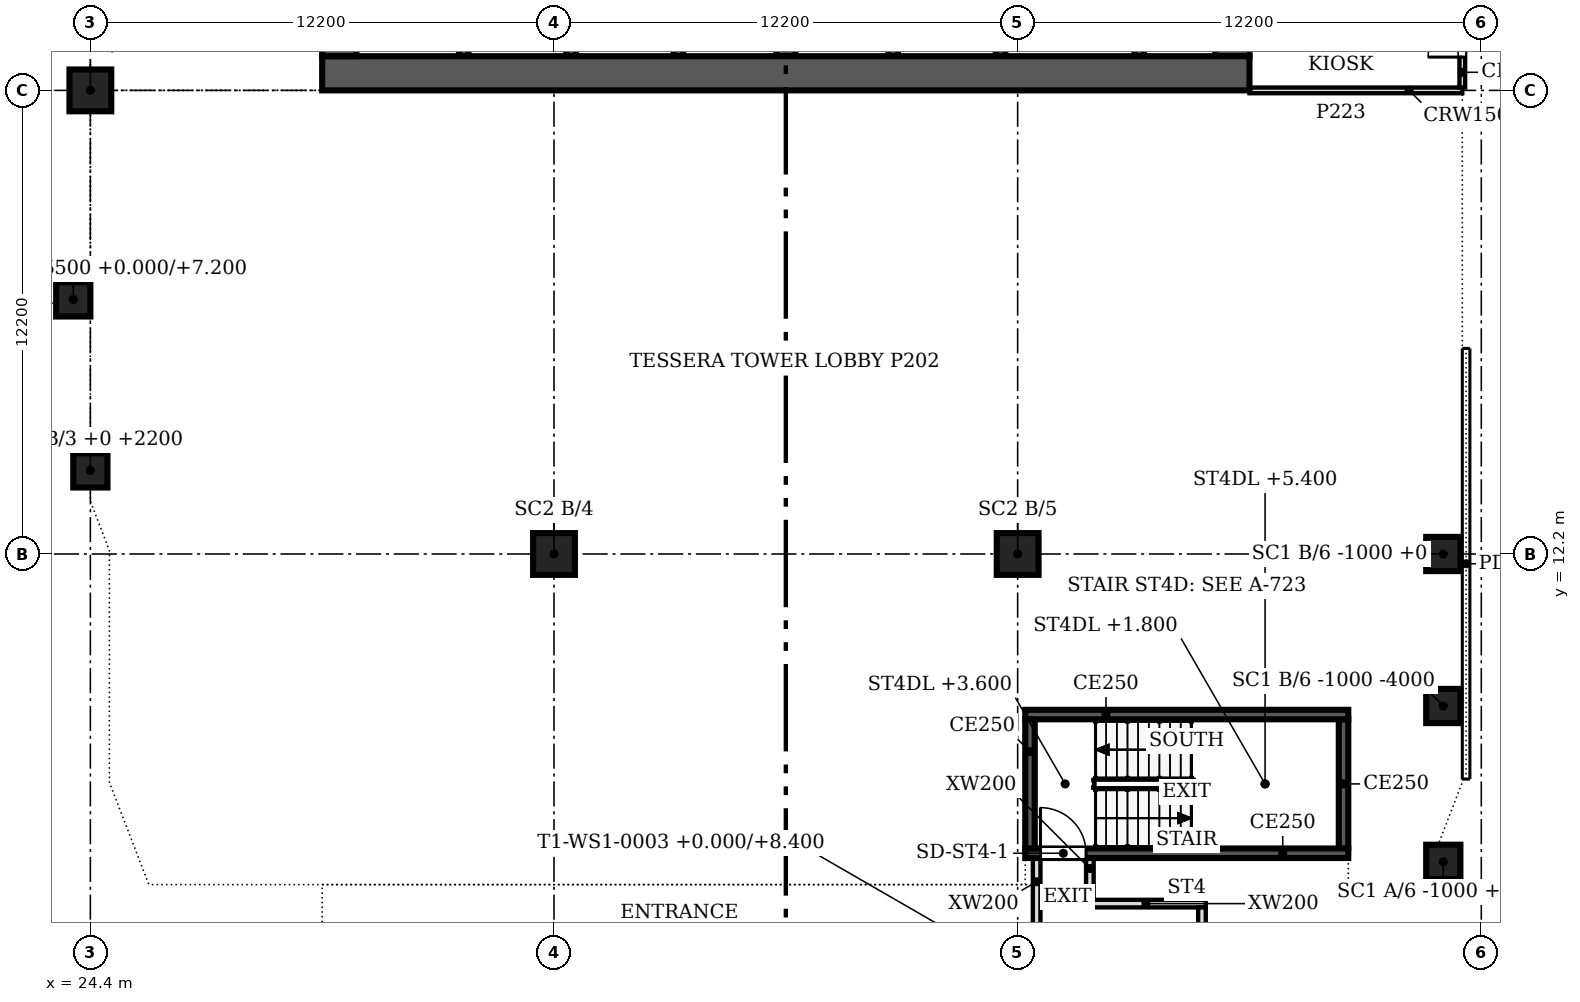
"""IFC4 building model, lengths in metres.
Left out: names, types, materials, properties, quantities, classifications, styles, units other than length and angle.
Written with IfcOpenShell. Run it as: python <this file> out.ifc"""

import sys

from ifc_helpers import new_model, si_unit, direction, frame, frame_2d, origin, origin_2d, place, context, subcontext, project, spatial, rectangle, extrude, faceted_brep, source, transform, mapped, element, fill, save


model = new_model("IFC4")
c1 = context("Model", 3, precision=1e-05, world=origin(), true_north=direction((0.0, 1.0)))
c2 = subcontext(c1, "Body", "Model", "MODEL_VIEW")
j1 = project(units=[si_unit("LENGTHUNIT", "METRE"), si_unit("PLANEANGLEUNIT", "RADIAN")], contexts=[c1])
p1 = place(None, origin())
s1 = spatial("IfcSite", under=j1, at=p1, CompositionType="ELEMENT")
p2 = place(p1, origin())
s2 = spatial("IfcBuilding", under=s1, at=p2, CompositionType="ELEMENT")
p3 = place(p2, origin())
s3 = spatial("IfcBuildingStorey", under=s2, at=p3, CompositionType="ELEMENT", Elevation=0.0)
for number, where, z_axis, x_axis in (
    (1, (24.4, 24.4, 0.0), (0.0, 0.0, 1.0), (1.0, 0.0, 0.0)),
    (2, (36.6, 12.2, 0.0), (0.0, 0.0, 1.0), (1.0, 0.0, 0.0)),
    (3, (48.8, 12.2, 0.0), (0.0, 0.0, 1.0), (1.0, 0.0, 0.0)),
):
    element("IfcColumn", number, at=place(p3, frame(where, z_axis=z_axis, x_axis=x_axis)), inside=s3, PredefinedType="COLUMN", context=c2, shape_type="SweptSolid", body=[
        extrude(rectangle(XDim=1.1, YDim=1.1, at=origin_2d()), origin(), (0.0, 0.0, 1.0), 6.95),
    ])
for number, where, z_axis, x_axis in (
    (4, (61.0, 19.0, 0.0), (0.0, 0.0, 1.0), (1.0, 0.0, 0.0)),
    (5, (60.0, 12.2, 0.0), (0.0, 0.0, 1.0), (1.0, 0.0, 0.0)),
    (6, (24.4, 14.4, 0.0), (0.0, 0.0, 1.0), (1.0, 0.0, 0.0)),
    (7, (60.0, 8.2, 0.0), (0.0, 0.0, 1.0), (1.0, 0.0, 0.0)),
    (8, (60.0, 4.1, 0.0), (0.0, 0.0, 1.0), (1.0, 0.0, 0.0)),
    (9, (61.0, 18.1, 0.0), (0.0, 0.0, 1.0), (1.0, 0.0, 0.0)),
):
    element("IfcColumn", number, at=place(p3, frame(where, z_axis=z_axis, x_axis=x_axis)), inside=s3, PredefinedType="COLUMN", context=c2, shape_type="SweptSolid", body=[
        extrude(rectangle(XDim=0.9, YDim=0.9, at=origin_2d()), origin(), (0.0, 0.0, 1.0), 6.95),
    ])
p4 = place(p3, frame((23.95, 18.9, 0.0), z_axis=(0.0, 0.0, 1.0), x_axis=(1.0, 0.0, 0.0)))
e10 = element("IfcColumn", 10, at=p4, inside=s3, PredefinedType="COLUMN", context=c2, shape_type="SweptSolid", body=[
    extrude(rectangle(XDim=0.9, YDim=0.9, at=origin_2d()), origin(), (0.0, 0.0, 1.0), 7.2),
])
p5 = place(p2, frame((0.0, 0.0, 7.2)))
s4 = spatial("IfcBuildingStorey", under=s2, at=p5, CompositionType="ELEMENT", Elevation=7.2)
m1 = source(origin(), c2, "Body", "Brep", [
    faceted_brep([(0.0, -0.25, 0.0), (6.155, -0.25, 0.0), (6.155, -0.25, 16.8), (0.0, -0.25, 16.8), (0.0, 0.25, 16.8), (6.108, 0.25, 16.8), (6.108, 0.25, 0.0), (0.0, 0.25, 0.0), (6.155, -0.0, 0.0), (6.155, -0.0, 16.8)], [[[0, 1, 2, 3]], [[4, 5, 6, 7]], [[7, 6, 8, 1, 0]], [[9, 2, 1, 8]], [[5, 4, 3, 2, 9]], [[4, 7, 0, 3]], [[8, 6, 5, 9]]]),
])
p6 = place(p5, frame((24.65, 12.301, -7.2), z_axis=(0.0, 0.0, 1.0), x_axis=(0.0, -1.0, 0.0)))
e11 = element("IfcWall", 11, at=p6, inside=s4, PredefinedType="SOLIDWALL", context=c2, shape_type="MappedRepresentation", body=[
    mapped(m1, transform((0.0, 0.0, 0.0), scale=1.0)),
])
m2 = source(origin(), c2, "Body", "Brep", [
    faceted_brep([(0.0, -0.25, 0.0), (2.944, -0.25, 0.0), (2.944, -0.25, 16.8), (0.0, -0.25, 16.8), (0.053, 0.25, 16.8), (2.891, 0.25, 16.8), (2.891, 0.25, 0.0), (0.053, 0.25, 0.0), (2.944, 0.0, 0.0), (0.0, 0.0, 0.0), (2.944, 0.0, 16.8), (0.0, 0.0, 16.8)], [[[0, 1, 2, 3]], [[4, 5, 6, 7]], [[7, 6, 8, 1, 0, 9]], [[10, 2, 1, 8]], [[5, 4, 11, 3, 2, 10]], [[9, 0, 3, 11]], [[7, 9, 11, 4]], [[8, 6, 5, 10]]]),
])
p7 = place(p5, frame((57.606, 1.312, -7.2), z_axis=(0.0, 0.0, 1.0), x_axis=(0.707106781187, 0.707106781187, 0.0)))
e12 = element("IfcWall", 12, at=p7, inside=s4, PredefinedType="SOLIDWALL", context=c2, shape_type="MappedRepresentation", body=[
    mapped(m2, transform((0.0, 0.0, 0.0), scale=1.0)),
])
m3 = source(origin(), c2, "Body", "Brep", [
    faceted_brep([(0.0, -0.25, 0.0), (2.95, -0.25, 0.0), (2.95, -0.25, 16.8), (0.0, -0.25, 16.8), (0.053, 0.25, 16.8), (2.904, 0.25, 16.8), (2.904, 0.25, 0.0), (0.053, 0.25, 0.0), (2.95, 0.0, 0.0), (0.0, 0.0, 0.0), (2.95, 0.0, 16.8), (0.0, 0.0, 16.8)], [[[0, 1, 2, 3]], [[4, 5, 6, 7]], [[7, 6, 8, 1, 0, 9]], [[10, 2, 1, 8]], [[5, 4, 11, 3, 2, 10]], [[9, 0, 3, 11]], [[7, 9, 11, 4]], [[8, 6, 5, 10]]]),
])
p8 = place(p5, frame((59.688, 3.394, -7.2), z_axis=(0.0, 0.0, 1.0), x_axis=(0.359949242603, 0.932971887438, 0.0)))
e13 = element("IfcWall", 13, at=p8, inside=s4, PredefinedType="SOLIDWALL", context=c2, shape_type="MappedRepresentation", body=[
    mapped(m3, transform((0.0, 0.0, 0.0), scale=1.0)),
])
m4 = source(origin(), c2, "Body", "Brep", [
    faceted_brep([(0.0, -0.25, 0.0), (2.95, -0.25, 0.0), (2.95, -0.25, 16.8), (0.0, -0.25, 16.8), (0.047, 0.25, 16.8), (2.898, 0.25, 16.8), (2.898, 0.25, 0.0), (0.047, 0.25, 0.0), (2.95, 0.0, 0.0), (0.0, 0.0, 0.0), (2.95, 0.0, 16.8), (0.0, 0.0, 16.8)], [[[0, 1, 2, 3]], [[4, 5, 6, 7]], [[7, 6, 8, 1, 0, 9]], [[10, 2, 1, 8]], [[5, 4, 11, 3, 2, 10]], [[9, 0, 3, 11]], [[7, 9, 11, 4]], [[8, 6, 5, 10]]]),
])
p9 = place(p5, frame((24.65, 6.146, -7.2), z_axis=(0.0, 0.0, 1.0), x_axis=(0.359949242603, -0.932971887438, 0.0)))
e14 = element("IfcWall", 14, at=p9, inside=s4, PredefinedType="SOLIDWALL", context=c2, shape_type="MappedRepresentation", body=[
    mapped(m4, transform((0.0, 0.0, 0.0), scale=1.0)),
])
p10 = place(p5, frame((25.712, 3.394, -7.2), z_axis=(0.0, 0.0, 1.0), x_axis=(0.707106781187, -0.707106781187, 0.0)))
e15 = element("IfcWall", 15, at=p10, inside=s4, PredefinedType="SOLIDWALL", context=c2, shape_type="MappedRepresentation", body=[
    mapped(m2, transform((0.0, 0.0, 0.0), scale=1.0)),
])
p11 = place(p3, frame((54.9, 24.85, 0.0), z_axis=(0.0, 0.0, 1.0), x_axis=(-1.0, 0.0, 0.0)))
e16 = element("IfcWall", 16, at=p11, inside=s3, PredefinedType="SHEAR", context=c2, shape_type="SweptSolid", body=[
    extrude(rectangle(XDim=24.4, YDim=0.9, at=frame_2d((12.2, 0.0))), origin(), (0.0, 0.0, 1.0), 7.2),
])
p12 = place(p3, frame((30.95, 25.3, 0.0), z_axis=(0.0, 0.0, 1.0), x_axis=(0.0, 1.0, 0.0)))
e17 = element("IfcWall", 17, at=p12, inside=s3, PredefinedType="SHEAR", context=c2, shape_type="SweptSolid", body=[
    extrude(rectangle(XDim=22.6, YDim=0.9, at=frame_2d((11.3, 0.0))), origin(), (0.0, 0.0, 1.0), 7.2),
])
m5 = source(origin(), c2, "Body", "SweptSolid", [
    extrude(rectangle(XDim=2.1, YDim=2.4, at=frame_2d((1.05, 1.2))), frame((0.0, 0.46, 0.0), z_axis=(0.0, -1.0, 0.0), x_axis=(1.0, 0.0, 0.0)), (0.0, 0.0, 1.0), 0.92),
])
p13 = place(p12, frame((4.5, 0.0, 0.0)))
e18 = element("IfcOpeningElement", 18, at=p13, cuts=e17, PredefinedType="OPENING", context=c2, shape_type="MappedRepresentation", body=[
    mapped(m5, transform((0.0, 0.0, 0.0), scale=1.0)),
])
p14 = place(p12, frame((16.0, 0.0, 0.0)))
e19 = element("IfcOpeningElement", 19, at=p14, cuts=e17, PredefinedType="OPENING", context=c2, shape_type="MappedRepresentation", body=[
    mapped(m5, transform((0.0, 0.0, 0.0), scale=1.0)),
])
p15 = place(p3, frame((54.45, 47.9, 0.0), z_axis=(0.0, 0.0, 1.0), x_axis=(0.0, -1.0, 0.0)))
e20 = element("IfcWall", 20, at=p15, inside=s3, PredefinedType="SHEAR", context=c2, shape_type="SweptSolid", body=[
    extrude(rectangle(XDim=22.6, YDim=0.9, at=frame_2d((11.3, 0.0))), origin(), (0.0, 0.0, 1.0), 7.2),
])
m6 = source(origin(), c2, "Body", "SweptSolid", [
    extrude(rectangle(XDim=2.4, YDim=2.1, at=frame_2d((1.2, 1.05))), frame((0.0, 0.46, 0.0), z_axis=(0.0, -1.0, 0.0), x_axis=(1.0, 0.0, 0.0)), (0.0, 0.0, 1.0), 0.92),
])
p16 = place(p15, frame((4.0, 0.0, 0.0)))
e21 = element("IfcOpeningElement", 21, at=p16, cuts=e20, PredefinedType="OPENING", context=c2, shape_type="MappedRepresentation", body=[
    mapped(m6, transform((0.0, 0.0, 0.0), scale=1.0)),
])
p17 = place(p3, frame((42.7, 25.3, 0.0), z_axis=(0.0, 0.0, 1.0), x_axis=(0.0, 1.0, 0.0)))
e22 = element("IfcWall", 22, at=p17, inside=s3, PredefinedType="SHEAR", context=c2, shape_type="SweptSolid", body=[
    extrude(rectangle(XDim=5.65, YDim=0.5, at=frame_2d((2.825, 0.0))), origin(), (0.0, 0.0, 1.0), 7.2),
])
m7 = source(origin(), c2, "Body", "SweptSolid", [
    extrude(rectangle(XDim=2.1, YDim=2.4, at=frame_2d((1.05, 1.2))), frame((0.0, 0.26, 0.0), z_axis=(0.0, -1.0, 0.0), x_axis=(1.0, 0.0, 0.0)), (0.0, 0.0, 1.0), 0.52),
])
p18 = place(p17, frame((3.05, 0.0, 0.0)))
e23 = element("IfcOpeningElement", 23, at=p18, cuts=e22, PredefinedType="OPENING", context=c2, shape_type="MappedRepresentation", body=[
    mapped(m7, transform((0.0, 0.0, 0.0), scale=1.0)),
])
p19 = place(p3, frame((48.35, 36.35, 0.0), z_axis=(0.0, 0.0, 1.0), x_axis=(0.0, -1.0, 0.0)))
e24 = element("IfcWall", 24, at=p19, inside=s3, PredefinedType="SOLIDWALL", context=c2, shape_type="SweptSolid", body=[
    extrude(rectangle(XDim=11.05, YDim=0.25, at=frame_2d((5.525, 0.0))), origin(), (0.0, 0.0, 1.0), 7.2),
])
m8 = source(origin(), c2, "Body", "SweptSolid", [
    extrude(rectangle(XDim=1.2, YDim=2.1, at=frame_2d((0.6, 1.05))), frame((0.0, 0.135, 0.0), z_axis=(0.0, -1.0, 0.0), x_axis=(1.0, 0.0, 0.0)), (0.0, 0.0, 1.0), 0.27),
])
p20 = place(p19, frame((3.225, 0.0, 0.0)))
e25 = element("IfcOpeningElement", 25, at=p20, cuts=e24, PredefinedType="OPENING", context=c2, shape_type="MappedRepresentation", body=[
    mapped(m8, transform((0.0, 0.0, 0.0), scale=1.0)),
])
p21 = place(p3, frame((52.0, 25.3, 0.0), z_axis=(0.0, 0.0, 1.0), x_axis=(0.0, 1.0, 0.0)))
e26 = element("IfcWall", 26, at=p21, inside=s3, PredefinedType="SOLIDWALL", context=c2, shape_type="SweptSolid", body=[
    extrude(rectangle(XDim=22.6, YDim=0.25, at=frame_2d((11.3, 0.0))), origin(), (0.0, 0.0, 1.0), 7.2),
])
p22 = place(p21, frame((6.625, 0.0, 0.0)))
e27 = element("IfcOpeningElement", 27, at=p22, cuts=e26, PredefinedType="OPENING", context=c2, shape_type="MappedRepresentation", body=[
    mapped(m8, transform((0.0, 0.0, 0.0), scale=1.0)),
])
m9 = source(origin(), c2, "Body", "SweptSolid", [
    extrude(rectangle(XDim=0.9, YDim=2.1, at=frame_2d((0.45, 1.05))), frame((0.0, 0.135, 0.0), z_axis=(0.0, -1.0, 0.0), x_axis=(1.0, 0.0, 0.0)), (0.0, 0.0, 1.0), 0.27),
])
p23 = place(p21, frame((9.25, 0.0, 0.0)))
e28 = element("IfcOpeningElement", 28, at=p23, cuts=e26, PredefinedType="OPENING", context=c2, shape_type="MappedRepresentation", body=[
    mapped(m9, transform((0.0, 0.0, 0.0), scale=1.0)),
])
p24 = place(p21, frame((12.55, 0.0, 0.0)))
e29 = element("IfcOpeningElement", 29, at=p24, cuts=e26, PredefinedType="OPENING", context=c2, shape_type="MappedRepresentation", body=[
    mapped(m9, transform((0.0, 0.0, 0.0), scale=1.0)),
])
p25 = place(p21, frame((14.775, 0.0, 0.0)))
e30 = element("IfcOpeningElement", 30, at=p25, cuts=e26, PredefinedType="OPENING", context=c2, shape_type="MappedRepresentation", body=[
    mapped(m8, transform((0.0, 0.0, 0.0), scale=1.0)),
])
for number, where, z_axis, x_axis in (
    (31, (34.225, 25.3, 0.0), (0.0, 0.0, 1.0), (0.0, 1.0, 0.0)),
    (32, (37.05, 25.3, 0.0), (0.0, 0.0, 1.0), (0.0, 1.0, 0.0)),
    (33, (39.875, 25.3, 0.0), (0.0, 0.0, 1.0), (0.0, 1.0, 0.0)),
    (34, (45.525, 25.3, 0.0), (0.0, 0.0, 1.0), (0.0, 1.0, 0.0)),
):
    element("IfcWall", number, at=place(p3, frame(where, z_axis=z_axis, x_axis=x_axis)), inside=s3, PredefinedType="SOLIDWALL", context=c2, shape_type="SweptSolid", body=[
        extrude(rectangle(XDim=2.875, YDim=0.25, at=frame_2d((1.438, 0.0))), origin(), (0.0, 0.0, 1.0), 7.2),
    ])
p26 = place(p3, frame((57.5, 4.325, 0.0), z_axis=(0.0, 0.0, 1.0), x_axis=(-1.0, 0.0, 0.0)))
e35 = element("IfcWall", 35, at=p26, inside=s3, PredefinedType="SOLIDWALL", context=c2, shape_type="SweptSolid", body=[
    extrude(rectangle(XDim=8.5, YDim=0.25, at=frame_2d((4.25, 0.0))), origin(), (0.0, 0.0, 1.0), 7.2),
])
p27 = place(p26, frame((6.9, 0.0, 0.0)))
e36 = element("IfcOpeningElement", 36, at=p27, cuts=e35, PredefinedType="OPENING", context=c2, shape_type="MappedRepresentation", body=[
    mapped(m8, transform((0.0, 0.0, 0.0), scale=1.0)),
])
p28 = place(p3, frame((49.125, 4.45, 0.0), z_axis=(0.0, 0.0, 1.0), x_axis=(0.0, 1.0, 0.0)))
e37 = element("IfcWall", 37, at=p28, inside=s3, PredefinedType="SOLIDWALL", context=c2, shape_type="SweptSolid", body=[
    extrude(rectangle(XDim=3.4, YDim=0.25, at=frame_2d((1.7, 0.0))), origin(), (0.0, 0.0, 1.0), 7.2),
])
p29 = place(p3, frame((49.0, 7.975, 0.0), z_axis=(0.0, 0.0, 1.0), x_axis=(1.0, 0.0, 0.0)))
e38 = element("IfcWall", 38, at=p29, inside=s3, PredefinedType="SOLIDWALL", context=c2, shape_type="SweptSolid", body=[
    extrude(rectangle(XDim=8.5, YDim=0.25, at=frame_2d((4.25, 0.0))), origin(), (0.0, 0.0, 1.0), 7.2),
])
p30 = place(p3, frame((57.375, 7.85, 0.0), z_axis=(0.0, 0.0, 1.0), x_axis=(0.0, -1.0, 0.0)))
e39 = element("IfcWall", 39, at=p30, inside=s3, PredefinedType="SOLIDWALL", context=c2, shape_type="SweptSolid", body=[
    extrude(rectangle(XDim=3.4, YDim=0.25, at=frame_2d((1.7, 0.0))), origin(), (0.0, 0.0, 1.0), 7.2),
])
p31 = place(p3, frame((49.3, 1.7, 0.0), z_axis=(0.0, 0.0, 1.0), x_axis=(0.0, 1.0, 0.0)))
e40 = element("IfcWall", 40, at=p31, inside=s3, PredefinedType="PARTITIONING", context=c2, shape_type="SweptSolid", body=[
    extrude(rectangle(XDim=2.5, YDim=0.2, at=frame_2d((1.25, 0.0))), origin(), (0.0, 0.0, 1.0), 6.115),
])
p32 = place(p3, frame((50.7, 3.1, 0.0), z_axis=(0.0, 0.0, 1.0), x_axis=(0.0, 1.0, 0.0)))
e41 = element("IfcWall", 41, at=p32, inside=s3, PredefinedType="PARTITIONING", context=c2, shape_type="SweptSolid", body=[
    extrude(rectangle(XDim=1.1, YDim=0.2, at=frame_2d((0.55, 0.0))), origin(), (0.0, 0.0, 1.0), 6.115),
])
p33 = place(p3, frame((50.6, 3.0, 0.0), z_axis=(0.0, 0.0, 1.0), x_axis=(1.0, 0.0, 0.0)))
e42 = element("IfcWall", 42, at=p33, inside=s3, PredefinedType="PARTITIONING", context=c2, shape_type="SweptSolid", body=[
    extrude(rectangle(XDim=3.15, YDim=0.2, at=frame_2d((1.575, 0.0))), origin(), (0.0, 0.0, 1.0), 6.115),
])
p34 = place(p3, frame((53.65, 0.5, 0.0), z_axis=(0.0, 0.0, 1.0), x_axis=(0.0, 1.0, 0.0)))
e43 = element("IfcWall", 43, at=p34, inside=s3, PredefinedType="PARTITIONING", context=c2, shape_type="SweptSolid", body=[
    extrude(rectangle(XDim=2.4, YDim=0.2, at=frame_2d((1.2, 0.0))), origin(), (0.0, 0.0, 1.0), 6.115),
])
p35 = place(p3, frame((54.9, 24.4, 0.0), z_axis=(0.0, 0.0, 1.0), x_axis=(1.0, 0.0, 0.0)))
e44 = element("IfcWall", 44, at=p35, inside=s3, PredefinedType="PARTITIONING", context=c2, shape_type="SweptSolid", body=[
    extrude(rectangle(XDim=5.6, YDim=0.15, at=frame_2d((2.8, 0.0))), origin(), (0.0, 0.0, 1.0), 6.115),
])
p36 = place(p3, frame((60.5, 24.476, 0.0), z_axis=(0.0, 0.0, 1.0), x_axis=(0.0, 1.0, 0.0)))
e45 = element("IfcWall", 45, at=p36, inside=s3, PredefinedType="PARTITIONING", context=c2, shape_type="SweptSolid", body=[
    extrude(rectangle(XDim=2.523, YDim=0.15, at=frame_2d((1.261, 0.0))), origin(), (0.0, 0.0, 1.0), 6.115),
])
m10 = source(origin(), c2, "Body", "SweptSolid", [
    extrude(rectangle(XDim=0.9, YDim=2.1, at=frame_2d((0.45, 1.05))), frame((0.0, 0.085, 0.0), z_axis=(0.0, -1.0, 0.0), x_axis=(1.0, 0.0, 0.0)), (0.0, 0.0, 1.0), 0.17),
])
p37 = place(p36, frame((0.8, 0.0, 0.0)))
e46 = element("IfcOpeningElement", 46, at=p37, cuts=e45, PredefinedType="OPENING", context=c2, shape_type="MappedRepresentation", body=[
    mapped(m10, transform((0.0, 0.0, 0.0), scale=1.0)),
])
m11 = source(origin(), c2, "Body", "SweptSolid", [
    extrude(rectangle(XDim=1.2, YDim=2.1, at=frame_2d((0.6, 1.05))), frame((0.0, 0.025, 0.0), z_axis=(0.0, -1.0, 0.0), x_axis=(1.0, 0.0, 0.0)), (0.0, 0.0, 1.0), 0.05),
])
p38 = place(p27, origin())
e47 = element("IfcDoor", 47, at=p38, inside=s3, OperationType="SINGLE_SWING_RIGHT", PredefinedType="DOOR", context=c2, shape_type="MappedRepresentation", body=[
    mapped(m11, transform((0.0, 0.0, 0.0), scale=1.0)),
])
fill(e36, e47)
m12 = source(origin(), c2, "Body", "SweptSolid", [
    extrude(rectangle(XDim=0.9, YDim=2.1, at=frame_2d((0.45, 1.05))), frame((0.0, 0.025, 0.0), z_axis=(0.0, -1.0, 0.0), x_axis=(1.0, 0.0, 0.0)), (0.0, 0.0, 1.0), 0.05),
])
p39 = place(p37, origin())
e48 = element("IfcDoor", 48, at=p39, inside=s3, OperationType="SINGLE_SWING_LEFT", PredefinedType="DOOR", context=c2, shape_type="MappedRepresentation", body=[
    mapped(m12, transform((0.0, 0.0, 0.0), scale=1.0)),
])
fill(e46, e48)
save(model, sys.argv[1])
